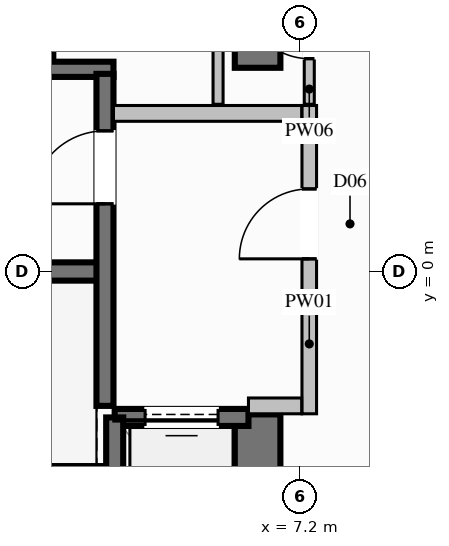
"""IFC4 building model, lengths in metres.
Left out: names, types, materials, properties, quantities, classifications, styles, units other than length and angle.
Written with IfcOpenShell. Run it as: python <this file> out.ifc"""

import sys

from ifc_helpers import new_model, si_unit, direction, frame, frame_2d, origin, place, context, subcontext, project, spatial, rectangle, extrude, element, fill, save


model = new_model("IFC4")
c1 = context("Model", 3, precision=1e-05, world=origin(), true_north=direction((0.0, 1.0)))
c2 = subcontext(c1, "Body", "Model", "MODEL_VIEW")
j1 = project(units=[si_unit("LENGTHUNIT", "METRE"), si_unit("PLANEANGLEUNIT", "RADIAN")], contexts=[c1])
p1 = place(None, origin())
s1 = spatial("IfcSite", under=j1, at=p1, CompositionType="ELEMENT")
p2 = place(p1, origin())
s2 = spatial("IfcBuilding", under=s1, at=p2, CompositionType="ELEMENT")
p3 = place(p2, frame((0.0, 0.0, 60.8)))
s3 = spatial("IfcBuildingStorey", under=s2, at=p3, CompositionType="ELEMENT", Elevation=60.8)
p4 = place(p3, frame((-3.99, 0.0, 0.0), z_axis=(0.0, 0.0, 1.0), x_axis=(1.0, 0.0, 0.0)))
e1 = element("IfcWall", 1, at=p4, inside=s3, PredefinedType="SHEAR", context=c2, shape_type="SweptSolid", body=[
    extrude(rectangle(XDim=7.98, YDim=0.3, at=frame_2d((3.99, 0.0))), origin(), (0.0, 0.0, 1.0), 3.6),
])
for number, where, z_axis, x_axis in (
    (2, (-4.13, -3.325, 0.0), (0.0, 0.0, 1.0), (1.0, 0.0, 0.0)),
    (3, (-4.13, 3.325, 0.0), (0.0, 0.0, 1.0), (1.0, 0.0, 0.0)),
):
    element("IfcWall", number, at=place(p3, frame(where, z_axis=z_axis, x_axis=x_axis)), inside=s3, PredefinedType="SOLIDWALL", context=c2, shape_type="SweptSolid", body=[
        extrude(rectangle(XDim=8.26, YDim=0.25, at=frame_2d((4.13, 0.0))), origin(), (0.0, 0.0, 1.0), 3.6),
    ])
p5 = place(p3, frame((6.5, -6.475, 0.0), z_axis=(0.0, 0.0, 1.0), x_axis=(0.0, 1.0, 0.0)))
e4 = element("IfcWall", 4, at=p5, inside=s3, PredefinedType="SHEAR", context=c2, shape_type="SweptSolid", body=[
    extrude(rectangle(XDim=4.125, YDim=0.75, at=frame_2d((2.062, 0.0))), origin(), (0.0, 0.0, 1.0), 3.6),
])
p6 = place(p3, frame((6.5, 3.35, 0.0), z_axis=(0.0, 0.0, 1.0), x_axis=(0.0, 1.0, 0.0)))
e5 = element("IfcWall", 5, at=p6, inside=s3, PredefinedType="SHEAR", context=c2, shape_type="SweptSolid", body=[
    extrude(rectangle(XDim=3.125, YDim=0.75, at=frame_2d((1.562, 0.0))), origin(), (0.0, 0.0, 1.0), 3.6),
])
p7 = place(p3, frame((3.0, 3.5, 0.0), z_axis=(0.0, 0.0, 1.0), x_axis=(0.0, 1.0, 0.0)))
e6 = element("IfcWall", 6, at=p7, inside=s3, PredefinedType="SOLIDWALL", context=c2, shape_type="SweptSolid", body=[
    extrude(rectangle(XDim=2.5, YDim=0.28, at=frame_2d((1.25, 0.0))), origin(), (0.0, 0.0, 1.0), 3.34),
])
p8 = place(p3, frame((6.35, -2.4, 0.0), z_axis=(0.0, 0.0, 1.0), x_axis=(-1.0, 0.0, 0.0)))
e7 = element("IfcWall", 7, at=p8, inside=s3, PredefinedType="SOLIDWALL", context=c2, shape_type="SweptSolid", body=[
    extrude(rectangle(XDim=2.2, YDim=0.28, at=frame_2d((1.1, 0.0))), origin(), (0.0, 0.0, 1.0), 3.34),
])
p9 = place(p8, frame((0.5, 0.0, 0.0)))
e8 = element("IfcOpeningElement", 8, at=p9, cuts=e7, PredefinedType="OPENING", context=c2, shape_type="SweptSolid", body=[
    extrude(rectangle(XDim=1.2, YDim=2.2, at=frame_2d((0.6, 1.1))), frame((0.0, 0.15, 0.0), z_axis=(0.0, -1.0, 0.0), x_axis=(1.0, 0.0, 0.0)), (0.0, 0.0, 1.0), 0.3),
])
p10 = place(p3, frame((4.15, -2.4, 0.0), z_axis=(0.0, 0.0, 1.0), x_axis=(0.0, -1.0, 0.0)))
e9 = element("IfcWall", 9, at=p10, inside=s3, PredefinedType="SOLIDWALL", context=c2, shape_type="SweptSolid", body=[
    extrude(rectangle(XDim=2.7, YDim=0.28, at=frame_2d((1.35, 0.0))), origin(), (0.0, 0.0, 1.0), 3.34),
])
p11 = place(p3, frame((3.99, -2.21, 0.0), z_axis=(0.0, 0.0, 1.0), x_axis=(0.0, 1.0, 0.0)))
e10 = element("IfcWall", 10, at=p11, inside=s3, PredefinedType="SOLIDWALL", context=c2, shape_type="SweptSolid", body=[
    extrude(rectangle(XDim=5.46, YDim=0.28, at=frame_2d((2.73, 0.0))), origin(), (0.0, 0.0, 1.0), 3.34),
])
p12 = place(p11, frame((3.323, 0.0, 0.0)))
e11 = element("IfcOpeningElement", 11, at=p12, cuts=e10, PredefinedType="OPENING", context=c2, shape_type="SweptSolid", body=[
    extrude(rectangle(XDim=1.2, YDim=2.2, at=frame_2d((0.6, 1.1))), frame((0.0, 0.15, 0.0), z_axis=(0.0, -1.0, 0.0), x_axis=(1.0, 0.0, 0.0)), (0.0, 0.0, 1.0), 0.3),
])
p13 = place(p3, frame((7.35, -2.34, 0.0), z_axis=(0.0, 0.0, 1.0), x_axis=(0.0, 1.0, 0.0)))
e12 = element("IfcWall", 12, at=p13, inside=s3, PredefinedType="PARTITIONING", context=c2, shape_type="SweptSolid", body=[
    extrude(rectangle(XDim=5.07, YDim=0.24, at=frame_2d((2.535, 0.0))), origin(), (0.0, 0.0, 1.0), 2.425),
])
p14 = place(p13, frame((2.548, 0.0, 0.0)))
e13 = element("IfcOpeningElement", 13, at=p14, cuts=e12, PredefinedType="OPENING", context=c2, shape_type="SweptSolid", body=[
    extrude(rectangle(XDim=1.15, YDim=2.2, at=frame_2d((0.575, 1.1))), frame((0.0, 0.13, 0.0), z_axis=(0.0, -1.0, 0.0), x_axis=(1.0, 0.0, 0.0)), (0.0, 0.0, 1.0), 0.26),
])
p15 = place(p3, frame((6.35, -2.21, 0.0), z_axis=(0.0, 0.0, 1.0), x_axis=(1.0, 0.0, 0.0)))
e14 = element("IfcWall", 14, at=p15, inside=s3, PredefinedType="PARTITIONING", context=c2, shape_type="SweptSolid", body=[
    extrude(rectangle(XDim=0.875, YDim=0.26, at=frame_2d((0.438, 0.0))), origin(), (0.0, 0.0, 1.0), 3.34),
])
p16 = place(p3, frame((4.13, 2.6, 0.0), z_axis=(0.0, 0.0, 1.0), x_axis=(1.0, 0.0, 0.0)))
e15 = element("IfcWall", 15, at=p16, inside=s3, PredefinedType="PARTITIONING", context=c2, shape_type="SweptSolid", body=[
    extrude(rectangle(XDim=3.095, YDim=0.26, at=frame_2d((1.548, 0.0))), origin(), (0.0, 0.0, 1.0), 3.34),
])
p17 = place(p3, frame((7.35, 2.75, 0.0), z_axis=(0.0, 0.0, 1.0), x_axis=(0.0, 1.0, 0.0)))
e16 = element("IfcWall", 16, at=p17, inside=s3, PredefinedType="PARTITIONING", context=c2, shape_type="SweptSolid", body=[
    extrude(rectangle(XDim=2.55, YDim=0.165, at=frame_2d((1.275, 0.0))), origin(), (0.0, 0.0, 1.0), 3.34),
])
p18 = place(p17, frame((0.75, 0.0, 0.0)))
e17 = element("IfcOpeningElement", 17, at=p18, cuts=e16, PredefinedType="OPENING", context=c2, shape_type="SweptSolid", body=[
    extrude(rectangle(XDim=1.05, YDim=2.15, at=frame_2d((0.525, 1.075))), frame((0.0, 0.093, 0.0), z_axis=(0.0, -1.0, 0.0), x_axis=(1.0, 0.0, 0.0)), (0.0, 0.0, 1.0), 0.185),
])
p19 = place(p3, frame((5.85, 5.3, 0.0), z_axis=(0.0, 0.0, 1.0), x_axis=(0.0, -1.0, 0.0)))
e18 = element("IfcWall", 18, at=p19, inside=s3, PredefinedType="PARTITIONING", context=c2, shape_type="SweptSolid", body=[
    extrude(rectangle(XDim=2.55, YDim=0.165, at=frame_2d((1.275, 0.0))), origin(), (0.0, 0.0, 1.0), 2.425),
])
p20 = place(p9, origin())
e19 = element("IfcDoor", 19, at=p20, inside=s3, OperationType="SLIDING_TO_LEFT", PredefinedType="DOOR", context=c2, shape_type="SweptSolid", body=[
    extrude(rectangle(XDim=1.2, YDim=2.2, at=frame_2d((0.6, 1.1))), frame((0.0, 0.025, 0.0), z_axis=(0.0, -1.0, 0.0), x_axis=(1.0, 0.0, 0.0)), (0.0, 0.0, 1.0), 0.05),
])
fill(e8, e19)
p21 = place(p12, origin())
e20 = element("IfcDoor", 20, at=p21, inside=s3, OperationType="SINGLE_SWING_LEFT", PredefinedType="DOOR", context=c2, shape_type="SweptSolid", body=[
    extrude(rectangle(XDim=1.2, YDim=2.2, at=frame_2d((0.6, 1.1))), frame((0.0, 0.025, 0.0), z_axis=(0.0, -1.0, 0.0), x_axis=(1.0, 0.0, 0.0)), (0.0, 0.0, 1.0), 0.05),
])
fill(e11, e20)
p22 = place(p14, origin())
e21 = element("IfcDoor", 21, at=p22, inside=s3, OperationType="SINGLE_SWING_LEFT", PredefinedType="DOOR", context=c2, shape_type="SweptSolid", body=[
    extrude(rectangle(XDim=1.15, YDim=2.2, at=frame_2d((0.575, 1.1))), frame((0.0, 0.025, 0.0), z_axis=(0.0, -1.0, 0.0), x_axis=(1.0, 0.0, 0.0)), (0.0, 0.0, 1.0), 0.05),
])
fill(e13, e21)
p23 = place(p18, origin())
e22 = element("IfcDoor", 22, at=p23, inside=s3, OperationType="SINGLE_SWING_RIGHT", PredefinedType="DOOR", context=c2, shape_type="SweptSolid", body=[
    extrude(rectangle(XDim=1.05, YDim=2.15, at=frame_2d((0.525, 1.075))), frame((0.0, 0.025, 0.0), z_axis=(0.0, -1.0, 0.0), x_axis=(1.0, 0.0, 0.0)), (0.0, 0.0, 1.0), 0.05),
])
fill(e17, e22)
save(model, sys.argv[1])
